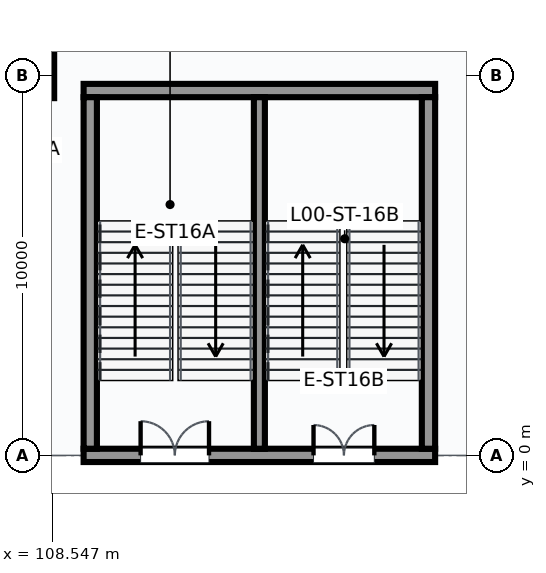
"""IFC4 building model, lengths in metres.
Left out: names, types, materials, properties, quantities, classifications, styles, units other than length and angle.
Written with IfcOpenShell. Run it as: python <this file> out.ifc"""

import sys

from ifc_helpers import new_model, si_unit, direction, frame, frame_2d, origin, origin_2d, place, context, subcontext, project, spatial, rectangle, extrude, element, fill, save


model = new_model("IFC4")
c1 = context("Model", 3, precision=1e-05, world=origin(), true_north=direction((0.0, 1.0)))
c2 = subcontext(c1, "Body", "Model", "MODEL_VIEW")
j1 = project(units=[si_unit("LENGTHUNIT", "METRE"), si_unit("PLANEANGLEUNIT", "RADIAN")], contexts=[c1])
p1 = place(None, origin())
s1 = spatial("IfcSite", under=j1, at=p1, CompositionType="ELEMENT")
p2 = place(p1, origin())
s2 = spatial("IfcBuilding", under=s1, at=p2, CompositionType="ELEMENT")
p3 = place(p2, origin())
s3 = spatial("IfcBuildingStorey", under=s2, at=p3, CompositionType="ELEMENT", Elevation=0.0)
p4 = place(p3, frame((108.0, 10.0, 0.0), z_axis=(0.0, 0.0, 1.0), x_axis=(1.0, 0.0, 0.0)))
e1 = element("IfcColumn", 1, at=p4, inside=s3, PredefinedType="COLUMN", context=c2, shape_type="SweptSolid", body=[
    extrude(rectangle(XDim=1.2, YDim=1.2, at=origin_2d()), origin(), (0.0, 0.0, 1.0), 5.4),
])
p5 = place(p3, frame((109.375, 0.0, 0.0), z_axis=(0.0, 0.0, 1.0), x_axis=(1.0, 0.0, 0.0)))
e2 = element("IfcWall", 2, at=p5, inside=s3, PredefinedType="SHEAR", context=c2, shape_type="SweptSolid", body=[
    extrude(rectangle(XDim=9.25, YDim=0.35, at=frame_2d((4.625, 0.0))), origin(), (0.0, 0.0, 1.0), 4.347),
])
p6 = place(p5, frame((1.5, 0.0, 0.0)))
e3 = element("IfcOpeningElement", 3, at=p6, cuts=e2, PredefinedType="OPENING", context=c2, shape_type="SweptSolid", body=[
    extrude(rectangle(XDim=1.8, YDim=2.2, at=frame_2d((0.9, 1.1))), frame((0.0, 0.185, 0.0), z_axis=(0.0, -1.0, 0.0), x_axis=(1.0, 0.0, 0.0)), (0.0, 0.0, 1.0), 0.37),
])
p7 = place(p5, frame((6.05, 0.0, 0.0)))
e4 = element("IfcOpeningElement", 4, at=p7, cuts=e2, PredefinedType="OPENING", context=c2, shape_type="SweptSolid", body=[
    extrude(rectangle(XDim=1.6, YDim=2.2, at=frame_2d((0.8, 1.1))), frame((0.0, 0.185, 0.0), z_axis=(0.0, -1.0, 0.0), x_axis=(1.0, 0.0, 0.0)), (0.0, 0.0, 1.0), 0.37),
])
for number, where, z_axis, x_axis in (
    (5, (109.375, 9.6, 0.0), (0.0, 0.0, 1.0), (1.0, 0.0, 0.0)),
    (6, (109.55, 0.175, 0.0), (0.0, 0.0, 1.0), (0.0, 1.0, 0.0)),
    (7, (118.45, 0.175, 0.0), (0.0, 0.0, 1.0), (0.0, 1.0, 0.0)),
):
    element("IfcWall", number, at=place(p3, frame(where, z_axis=z_axis, x_axis=x_axis)), inside=s3, PredefinedType="SHEAR", context=c2, shape_type="SweptSolid", body=[
        extrude(rectangle(XDim=9.25, YDim=0.35, at=frame_2d((4.625, 0.0))), origin(), (0.0, 0.0, 1.0), 5.4),
    ])
p8 = place(p3, frame((114.0, 0.175, 0.0), z_axis=(0.0, 0.0, 1.0), x_axis=(0.0, 1.0, 0.0)))
e8 = element("IfcWall", 8, at=p8, inside=s3, PredefinedType="SHEAR", context=c2, shape_type="SweptSolid", body=[
    extrude(rectangle(XDim=9.25, YDim=0.29, at=frame_2d((4.625, 0.0))), origin(), (0.0, 0.0, 1.0), 5.4),
])
p9 = place(p6, frame((1.8, 0.0, 0.0), z_axis=(0.0, 0.0, 1.0), x_axis=(-1.0, 0.0, 0.0)))
e9 = element("IfcDoor", 9, at=p9, inside=s3, OperationType="DOUBLE_DOOR_SINGLE_SWING", PredefinedType="DOOR", context=c2, shape_type="SweptSolid", body=[
    extrude(rectangle(XDim=1.8, YDim=2.2, at=frame_2d((0.9, 1.1))), frame((0.0, 0.025, 0.0), z_axis=(0.0, -1.0, 0.0), x_axis=(1.0, 0.0, 0.0)), (0.0, 0.0, 1.0), 0.05),
])
fill(e3, e9)
p10 = place(p7, frame((1.6, 0.0, 0.0), z_axis=(0.0, 0.0, 1.0), x_axis=(-1.0, 0.0, 0.0)))
e10 = element("IfcDoor", 10, at=p10, inside=s3, OperationType="DOUBLE_DOOR_SINGLE_SWING", PredefinedType="DOOR", context=c2, shape_type="SweptSolid", body=[
    extrude(rectangle(XDim=1.6, YDim=2.2, at=frame_2d((0.8, 1.1))), frame((0.0, 0.025, 0.0), z_axis=(0.0, -1.0, 0.0), x_axis=(1.0, 0.0, 0.0)), (0.0, 0.0, 1.0), 0.05),
])
fill(e4, e10)
save(model, sys.argv[1])
